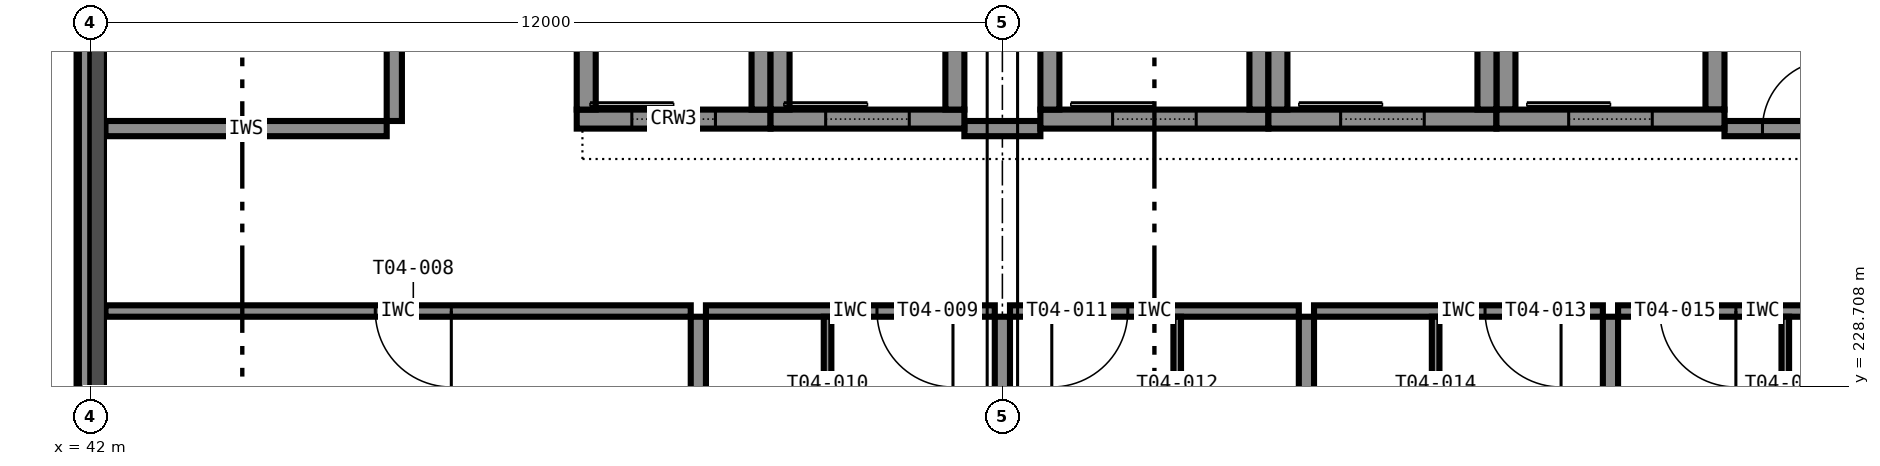
"""IFC4 building model, lengths in metres.
Left out: names, types, materials, properties, quantities, classifications, styles, units other than length and angle.
Written with IfcOpenShell. Run it as: python <this file> out.ifc"""

import sys

from ifc_helpers import new_model, si_unit, direction, frame, frame_2d, origin, place, context, subcontext, project, spatial, rectangle, extrude, element, fill, save


model = new_model("IFC4")
c1 = context("Model", 3, precision=1e-05, world=origin(), true_north=direction((0.0, 1.0)))
c2 = subcontext(c1, "Body", "Model", "MODEL_VIEW")
j1 = project(units=[si_unit("LENGTHUNIT", "METRE"), si_unit("PLANEANGLEUNIT", "RADIAN")], contexts=[c1])
p1 = place(None, origin())
s1 = spatial("IfcSite", under=j1, at=p1, CompositionType="ELEMENT")
p2 = place(p1, origin())
s2 = spatial("IfcBuilding", under=s1, at=p2, CompositionType="ELEMENT")
p3 = place(p2, frame((0.0, 0.0, 24.6)))
s3 = spatial("IfcBuildingStorey", under=s2, at=p3, CompositionType="ELEMENT", Elevation=24.6)
p4 = place(p3, frame((54.5, 232.225, 0.0), z_axis=(0.0, 0.0, 1.0), x_axis=(1.0, 0.0, 0.0)))
e1 = element("IfcWall", 1, at=p4, inside=s3, PredefinedType="SHEAR", context=c2, shape_type="SweptSolid", body=[
    extrude(rectangle(XDim=3.0, YDim=0.25, at=frame_2d((1.5, 0.0))), origin(), (0.0, 0.0, 1.0), 3.6),
])
p5 = place(p4, frame((0.95, 0.0, 0.0)))
e2 = element("IfcOpeningElement", 2, at=p5, cuts=e1, PredefinedType="OPENING", context=c2, shape_type="SweptSolid", body=[
    extrude(rectangle(XDim=1.1, YDim=2.1, at=frame_2d((0.55, 1.05))), frame((0.0, 0.135, 0.0), z_axis=(0.0, -1.0, 0.0), x_axis=(1.0, 0.0, 0.0)), (0.0, 0.0, 1.0), 0.27),
])
for number, where, z_axis, x_axis in (
    (3, (54.625, 232.35, 0.0), (0.0, 0.0, 1.0), (0.0, 1.0, 0.0)),
    (4, (57.375, 232.35, 0.0), (0.0, 0.0, 1.0), (0.0, 1.0, 0.0)),
):
    element("IfcWall", number, at=place(p3, frame(where, z_axis=z_axis, x_axis=x_axis)), inside=s3, PredefinedType="SHEAR", context=c2, shape_type="SweptSolid", body=[
        extrude(rectangle(XDim=3.3, YDim=0.25, at=frame_2d((1.65, 0.0))), origin(), (0.0, 0.0, 1.0), 3.6),
    ])
p6 = place(p3, frame((57.5, 232.225, 0.0), z_axis=(0.0, 0.0, 1.0), x_axis=(1.0, 0.0, 0.0)))
e5 = element("IfcWall", 5, at=p6, inside=s3, PredefinedType="SHEAR", context=c2, shape_type="SweptSolid", body=[
    extrude(rectangle(XDim=3.0, YDim=0.25, at=frame_2d((1.5, 0.0))), origin(), (0.0, 0.0, 1.0), 3.6),
])
p7 = place(p6, frame((0.95, 0.0, 0.0)))
e6 = element("IfcOpeningElement", 6, at=p7, cuts=e5, PredefinedType="OPENING", context=c2, shape_type="SweptSolid", body=[
    extrude(rectangle(XDim=1.1, YDim=2.1, at=frame_2d((0.55, 1.05))), frame((0.0, 0.135, 0.0), z_axis=(0.0, -1.0, 0.0), x_axis=(1.0, 0.0, 0.0)), (0.0, 0.0, 1.0), 0.27),
])
for number, where, z_axis, x_axis in (
    (7, (57.625, 232.35, 0.0), (0.0, 0.0, 1.0), (0.0, 1.0, 0.0)),
    (8, (60.375, 232.35, 0.0), (0.0, 0.0, 1.0), (0.0, 1.0, 0.0)),
):
    element("IfcWall", number, at=place(p3, frame(where, z_axis=z_axis, x_axis=x_axis)), inside=s3, PredefinedType="SHEAR", context=c2, shape_type="SweptSolid", body=[
        extrude(rectangle(XDim=3.3, YDim=0.25, at=frame_2d((1.65, 0.0))), origin(), (0.0, 0.0, 1.0), 3.6),
    ])
p8 = place(p3, frame((60.5, 232.225, 0.0), z_axis=(0.0, 0.0, 1.0), x_axis=(1.0, 0.0, 0.0)))
e9 = element("IfcWall", 9, at=p8, inside=s3, PredefinedType="SHEAR", context=c2, shape_type="SweptSolid", body=[
    extrude(rectangle(XDim=3.0, YDim=0.25, at=frame_2d((1.5, 0.0))), origin(), (0.0, 0.0, 1.0), 3.6),
])
p9 = place(p8, frame((0.95, 0.0, 0.0)))
e10 = element("IfcOpeningElement", 10, at=p9, cuts=e9, PredefinedType="OPENING", context=c2, shape_type="SweptSolid", body=[
    extrude(rectangle(XDim=1.1, YDim=2.1, at=frame_2d((0.55, 1.05))), frame((0.0, 0.135, 0.0), z_axis=(0.0, -1.0, 0.0), x_axis=(1.0, 0.0, 0.0)), (0.0, 0.0, 1.0), 0.27),
])
for number, where, z_axis, x_axis in (
    (11, (60.625, 232.35, 0.0), (0.0, 0.0, 1.0), (0.0, 1.0, 0.0)),
    (12, (63.375, 232.35, 0.0), (0.0, 0.0, 1.0), (0.0, 1.0, 0.0)),
):
    element("IfcWall", number, at=place(p3, frame(where, z_axis=z_axis, x_axis=x_axis)), inside=s3, PredefinedType="SHEAR", context=c2, shape_type="SweptSolid", body=[
        extrude(rectangle(XDim=3.3, YDim=0.25, at=frame_2d((1.65, 0.0))), origin(), (0.0, 0.0, 1.0), 3.6),
    ])
p10 = place(p3, frame((48.4, 232.225, 0.0), z_axis=(0.0, 0.0, 1.0), x_axis=(1.0, 0.0, 0.0)))
e13 = element("IfcWall", 13, at=p10, inside=s3, PredefinedType="SHEAR", context=c2, shape_type="SweptSolid", body=[
    extrude(rectangle(XDim=2.55, YDim=0.25, at=frame_2d((1.275, 0.0))), origin(), (0.0, 0.0, 1.0), 3.6),
])
p11 = place(p10, frame((0.725, 0.0, 0.0)))
e14 = element("IfcOpeningElement", 14, at=p11, cuts=e13, PredefinedType="OPENING", context=c2, shape_type="SweptSolid", body=[
    extrude(rectangle(XDim=1.1, YDim=2.1, at=frame_2d((0.55, 1.05))), frame((0.0, 0.135, 0.0), z_axis=(0.0, -1.0, 0.0), x_axis=(1.0, 0.0, 0.0)), (0.0, 0.0, 1.0), 0.27),
])
for number, where, z_axis, x_axis in (
    (15, (48.525, 232.35, 0.0), (0.0, 0.0, 1.0), (0.0, 1.0, 0.0)),
    (16, (50.825, 232.35, 0.0), (0.0, 0.0, 1.0), (0.0, 1.0, 0.0)),
):
    element("IfcWall", number, at=place(p3, frame(where, z_axis=z_axis, x_axis=x_axis)), inside=s3, PredefinedType="SHEAR", context=c2, shape_type="SweptSolid", body=[
        extrude(rectangle(XDim=3.3, YDim=0.25, at=frame_2d((1.65, 0.0))), origin(), (0.0, 0.0, 1.0), 3.6),
    ])
p12 = place(p3, frame((50.95, 232.225, 0.0), z_axis=(0.0, 0.0, 1.0), x_axis=(1.0, 0.0, 0.0)))
e17 = element("IfcWall", 17, at=p12, inside=s3, PredefinedType="SHEAR", context=c2, shape_type="SweptSolid", body=[
    extrude(rectangle(XDim=2.55, YDim=0.25, at=frame_2d((1.275, 0.0))), origin(), (0.0, 0.0, 1.0), 3.6),
])
p13 = place(p12, frame((0.725, 0.0, 0.0)))
e18 = element("IfcOpeningElement", 18, at=p13, cuts=e17, PredefinedType="OPENING", context=c2, shape_type="SweptSolid", body=[
    extrude(rectangle(XDim=1.1, YDim=2.1, at=frame_2d((0.55, 1.05))), frame((0.0, 0.135, 0.0), z_axis=(0.0, -1.0, 0.0), x_axis=(1.0, 0.0, 0.0)), (0.0, 0.0, 1.0), 0.27),
])
for number, where, z_axis, x_axis in (
    (19, (51.075, 232.35, 0.0), (0.0, 0.0, 1.0), (0.0, 1.0, 0.0)),
    (20, (53.375, 232.35, 0.0), (0.0, 0.0, 1.0), (0.0, 1.0, 0.0)),
):
    element("IfcWall", number, at=place(p3, frame(where, z_axis=z_axis, x_axis=x_axis)), inside=s3, PredefinedType="SHEAR", context=c2, shape_type="SweptSolid", body=[
        extrude(rectangle(XDim=3.3, YDim=0.25, at=frame_2d((1.65, 0.0))), origin(), (0.0, 0.0, 1.0), 3.6),
    ])
p14 = place(p3, frame((41.925, 233.55, 3.4), z_axis=(0.0, 0.0, 1.0), x_axis=(0.0, -1.0, 0.0)))
e21 = element("IfcWall", 21, at=p14, inside=s3, PredefinedType="STANDARD", context=c2, shape_type="SweptSolid", body=[
    extrude(rectangle(XDim=11.1, YDim=0.15, at=frame_2d((5.55, 0.0))), origin(), (0.0, 0.0, 1.0), 0.2),
])
p15 = place(p3, frame((42.2, 232.1, 0.0), z_axis=(0.0, 0.0, 1.0), x_axis=(1.0, 0.0, 0.0)))
e22 = element("IfcWall", 22, at=p15, inside=s3, PredefinedType="PARTITIONING", context=c2, shape_type="SweptSolid", body=[
    extrude(rectangle(XDim=3.7, YDim=0.2, at=frame_2d((1.85, 0.0))), origin(), (0.0, 0.0, 1.0), 3.4),
])
p16 = place(p3, frame((53.5, 232.1, 0.0), z_axis=(0.0, 0.0, 1.0), x_axis=(1.0, 0.0, 0.0)))
e23 = element("IfcWall", 23, at=p16, inside=s3, PredefinedType="PARTITIONING", context=c2, shape_type="SweptSolid", body=[
    extrude(rectangle(XDim=1.0, YDim=0.2, at=frame_2d((0.5, 0.0))), origin(), (0.0, 0.0, 1.0), 3.4),
])
p17 = place(p3, frame((63.5, 232.1, 0.0), z_axis=(0.0, 0.0, 1.0), x_axis=(1.0, 0.0, 0.0)))
e24 = element("IfcWall", 24, at=p17, inside=s3, PredefinedType="PARTITIONING", context=c2, shape_type="SweptSolid", body=[
    extrude(rectangle(XDim=1.9, YDim=0.2, at=frame_2d((0.95, 0.0))), origin(), (0.0, 0.0, 1.0), 3.4),
])
p18 = place(p17, frame((0.5, 0.0, 0.0)))
e25 = element("IfcOpeningElement", 25, at=p18, cuts=e24, PredefinedType="OPENING", context=c2, shape_type="SweptSolid", body=[
    extrude(rectangle(XDim=0.9, YDim=2.1, at=frame_2d((0.45, 1.05))), frame((0.0, 0.11, 0.0), z_axis=(0.0, -1.0, 0.0), x_axis=(1.0, 0.0, 0.0)), (0.0, 0.0, 1.0), 0.22),
])
p19 = place(p3, frame((46.0, 232.2, 0.0), z_axis=(0.0, 0.0, 1.0), x_axis=(0.0, 1.0, 0.0)))
e26 = element("IfcWall", 26, at=p19, inside=s3, PredefinedType="PARTITIONING", context=c2, shape_type="SweptSolid", body=[
    extrude(rectangle(XDim=3.6, YDim=0.2, at=frame_2d((1.8, 0.0))), origin(), (0.0, 0.0, 1.0), 3.4),
])
p20 = place(p19, frame((1.35, 0.0, 0.0)))
e27 = element("IfcOpeningElement", 27, at=p20, cuts=e26, PredefinedType="OPENING", context=c2, shape_type="SweptSolid", body=[
    extrude(rectangle(XDim=0.9, YDim=2.1, at=frame_2d((0.45, 1.05))), frame((0.0, 0.11, 0.0), z_axis=(0.0, -1.0, 0.0), x_axis=(1.0, 0.0, 0.0)), (0.0, 0.0, 1.0), 0.22),
])
p21 = place(p3, frame((49.9, 229.7, 0.0), z_axis=(0.0, 0.0, 1.0), x_axis=(-1.0, 0.0, 0.0)))
e28 = element("IfcWall", 28, at=p21, inside=s3, PredefinedType="PARTITIONING", context=c2, shape_type="SweptSolid", body=[
    extrude(rectangle(XDim=7.7, YDim=0.15, at=frame_2d((3.85, 0.0))), origin(), (0.0, 0.0, 1.0), 3.4),
])
p22 = place(p21, frame((3.15, 0.0, 0.0)))
e29 = element("IfcOpeningElement", 29, at=p22, cuts=e28, PredefinedType="OPENING", context=c2, shape_type="SweptSolid", body=[
    extrude(rectangle(XDim=1.0, YDim=2.1, at=frame_2d((0.5, 1.05))), frame((0.0, 0.085, 0.0), z_axis=(0.0, -1.0, 0.0), x_axis=(1.0, 0.0, 0.0)), (0.0, 0.0, 1.0), 0.17),
])
p23 = place(p3, frame((53.9, 229.7, 0.0), z_axis=(0.0, 0.0, 1.0), x_axis=(-1.0, 0.0, 0.0)))
e30 = element("IfcWall", 30, at=p23, inside=s3, PredefinedType="PARTITIONING", context=c2, shape_type="SweptSolid", body=[
    extrude(rectangle(XDim=3.8, YDim=0.15, at=frame_2d((1.9, 0.0))), origin(), (0.0, 0.0, 1.0), 3.4),
])
p24 = place(p23, frame((0.55, 0.0, 0.0)))
e31 = element("IfcOpeningElement", 31, at=p24, cuts=e30, PredefinedType="OPENING", context=c2, shape_type="SweptSolid", body=[
    extrude(rectangle(XDim=1.0, YDim=2.1, at=frame_2d((0.5, 1.05))), frame((0.0, 0.085, 0.0), z_axis=(0.0, -1.0, 0.0), x_axis=(1.0, 0.0, 0.0)), (0.0, 0.0, 1.0), 0.17),
])
p25 = place(p3, frame((51.7, 229.625, 0.0), z_axis=(0.0, 0.0, 1.0), x_axis=(0.0, -1.0, 0.0)))
e32 = element("IfcWall", 32, at=p25, inside=s3, PredefinedType="PARTITIONING", context=c2, shape_type="SweptSolid", body=[
    extrude(rectangle(XDim=2.875, YDim=0.1, at=frame_2d((1.438, 0.0))), origin(), (0.0, 0.0, 1.0), 3.4),
])
p26 = place(p25, frame((1.038, 0.0, 0.0)))
e33 = element("IfcOpeningElement", 33, at=p26, cuts=e32, PredefinedType="OPENING", context=c2, shape_type="SweptSolid", body=[
    extrude(rectangle(XDim=0.8, YDim=2.1, at=frame_2d((0.4, 1.05))), frame((0.0, 0.06, 0.0), z_axis=(0.0, -1.0, 0.0), x_axis=(1.0, 0.0, 0.0)), (0.0, 0.0, 1.0), 0.12),
])
p27 = place(p3, frame((57.9, 229.7, 0.0), z_axis=(0.0, 0.0, 1.0), x_axis=(-1.0, 0.0, 0.0)))
e34 = element("IfcWall", 34, at=p27, inside=s3, PredefinedType="PARTITIONING", context=c2, shape_type="SweptSolid", body=[
    extrude(rectangle(XDim=3.8, YDim=0.15, at=frame_2d((1.9, 0.0))), origin(), (0.0, 0.0, 1.0), 3.4),
])
p28 = place(p27, frame((2.25, 0.0, 0.0)))
e35 = element("IfcOpeningElement", 35, at=p28, cuts=e34, PredefinedType="OPENING", context=c2, shape_type="SweptSolid", body=[
    extrude(rectangle(XDim=1.0, YDim=2.1, at=frame_2d((0.5, 1.05))), frame((0.0, 0.085, 0.0), z_axis=(0.0, -1.0, 0.0), x_axis=(1.0, 0.0, 0.0)), (0.0, 0.0, 1.0), 0.17),
])
p29 = place(p3, frame((56.3, 226.75, 0.0), z_axis=(0.0, 0.0, 1.0), x_axis=(0.0, 1.0, 0.0)))
e36 = element("IfcWall", 36, at=p29, inside=s3, PredefinedType="PARTITIONING", context=c2, shape_type="SweptSolid", body=[
    extrude(rectangle(XDim=2.875, YDim=0.1, at=frame_2d((1.438, 0.0))), origin(), (0.0, 0.0, 1.0), 3.4),
])
p30 = place(p29, frame((1.038, 0.0, 0.0)))
e37 = element("IfcOpeningElement", 37, at=p30, cuts=e36, PredefinedType="OPENING", context=c2, shape_type="SweptSolid", body=[
    extrude(rectangle(XDim=0.8, YDim=2.1, at=frame_2d((0.4, 1.05))), frame((0.0, 0.06, 0.0), z_axis=(0.0, -1.0, 0.0), x_axis=(1.0, 0.0, 0.0)), (0.0, 0.0, 1.0), 0.12),
])
p31 = place(p3, frame((61.9, 229.7, 0.0), z_axis=(0.0, 0.0, 1.0), x_axis=(-1.0, 0.0, 0.0)))
e38 = element("IfcWall", 38, at=p31, inside=s3, PredefinedType="PARTITIONING", context=c2, shape_type="SweptSolid", body=[
    extrude(rectangle(XDim=3.8, YDim=0.15, at=frame_2d((1.9, 0.0))), origin(), (0.0, 0.0, 1.0), 3.4),
])
p32 = place(p31, frame((0.55, 0.0, 0.0)))
e39 = element("IfcOpeningElement", 39, at=p32, cuts=e38, PredefinedType="OPENING", context=c2, shape_type="SweptSolid", body=[
    extrude(rectangle(XDim=1.0, YDim=2.1, at=frame_2d((0.5, 1.05))), frame((0.0, 0.085, 0.0), z_axis=(0.0, -1.0, 0.0), x_axis=(1.0, 0.0, 0.0)), (0.0, 0.0, 1.0), 0.17),
])
p33 = place(p3, frame((59.7, 229.625, 0.0), z_axis=(0.0, 0.0, 1.0), x_axis=(0.0, -1.0, 0.0)))
e40 = element("IfcWall", 40, at=p33, inside=s3, PredefinedType="PARTITIONING", context=c2, shape_type="SweptSolid", body=[
    extrude(rectangle(XDim=2.875, YDim=0.1, at=frame_2d((1.438, 0.0))), origin(), (0.0, 0.0, 1.0), 3.4),
])
p34 = place(p33, frame((1.038, 0.0, 0.0)))
e41 = element("IfcOpeningElement", 41, at=p34, cuts=e40, PredefinedType="OPENING", context=c2, shape_type="SweptSolid", body=[
    extrude(rectangle(XDim=0.8, YDim=2.1, at=frame_2d((0.4, 1.05))), frame((0.0, 0.06, 0.0), z_axis=(0.0, -1.0, 0.0), x_axis=(1.0, 0.0, 0.0)), (0.0, 0.0, 1.0), 0.12),
])
p35 = place(p3, frame((65.9, 229.7, 0.0), z_axis=(0.0, 0.0, 1.0), x_axis=(-1.0, 0.0, 0.0)))
e42 = element("IfcWall", 42, at=p35, inside=s3, PredefinedType="PARTITIONING", context=c2, shape_type="SweptSolid", body=[
    extrude(rectangle(XDim=3.8, YDim=0.15, at=frame_2d((1.9, 0.0))), origin(), (0.0, 0.0, 1.0), 3.4),
])
p36 = place(p35, frame((2.25, 0.0, 0.0)))
e43 = element("IfcOpeningElement", 43, at=p36, cuts=e42, PredefinedType="OPENING", context=c2, shape_type="SweptSolid", body=[
    extrude(rectangle(XDim=1.0, YDim=2.1, at=frame_2d((0.5, 1.05))), frame((0.0, 0.085, 0.0), z_axis=(0.0, -1.0, 0.0), x_axis=(1.0, 0.0, 0.0)), (0.0, 0.0, 1.0), 0.17),
])
p37 = place(p3, frame((64.3, 226.75, 0.0), z_axis=(0.0, 0.0, 1.0), x_axis=(0.0, 1.0, 0.0)))
e44 = element("IfcWall", 44, at=p37, inside=s3, PredefinedType="PARTITIONING", context=c2, shape_type="SweptSolid", body=[
    extrude(rectangle(XDim=2.875, YDim=0.1, at=frame_2d((1.438, 0.0))), origin(), (0.0, 0.0, 1.0), 3.4),
])
p38 = place(p37, frame((1.038, 0.0, 0.0)))
e45 = element("IfcOpeningElement", 45, at=p38, cuts=e44, PredefinedType="OPENING", context=c2, shape_type="SweptSolid", body=[
    extrude(rectangle(XDim=0.8, YDim=2.1, at=frame_2d((0.4, 1.05))), frame((0.0, 0.06, 0.0), z_axis=(0.0, -1.0, 0.0), x_axis=(1.0, 0.0, 0.0)), (0.0, 0.0, 1.0), 0.12),
])
p39 = place(p3, frame((50.0, 222.3, 0.0), z_axis=(0.0, 0.0, 1.0), x_axis=(0.0, 1.0, 0.0)))
e46 = element("IfcWall", 46, at=p39, inside=s3, PredefinedType="PARTITIONING", context=c2, shape_type="SweptSolid", body=[
    extrude(rectangle(XDim=7.325, YDim=0.2, at=frame_2d((3.663, 0.0))), origin(), (0.0, 0.0, 1.0), 3.4),
])
p40 = place(p3, frame((54.0, 222.45, 0.0), z_axis=(0.0, 0.0, 1.0), x_axis=(0.0, 1.0, 0.0)))
e47 = element("IfcWall", 47, at=p40, inside=s3, PredefinedType="PARTITIONING", context=c2, shape_type="SweptSolid", body=[
    extrude(rectangle(XDim=7.175, YDim=0.2, at=frame_2d((3.587, 0.0))), origin(), (0.0, 0.0, 1.0), 2.6),
])
for number, where, z_axis, x_axis in (
    (48, (58.0, 222.3, 0.0), (0.0, 0.0, 1.0), (0.0, 1.0, 0.0)),
    (49, (62.0, 222.3, 0.0), (0.0, 0.0, 1.0), (0.0, 1.0, 0.0)),
):
    element("IfcWall", number, at=place(p3, frame(where, z_axis=z_axis, x_axis=x_axis)), inside=s3, PredefinedType="PARTITIONING", context=c2, shape_type="SweptSolid", body=[
        extrude(rectangle(XDim=7.325, YDim=0.2, at=frame_2d((3.663, 0.0))), origin(), (0.0, 0.0, 1.0), 3.4),
    ])
p41 = place(p18, origin())
e50 = element("IfcDoor", 50, at=p41, inside=s3, OperationType="SINGLE_SWING_RIGHT", PredefinedType="DOOR", context=c2, shape_type="SweptSolid", body=[
    extrude(rectangle(XDim=0.9, YDim=2.1, at=frame_2d((0.45, 1.05))), frame((0.0, 0.025, 0.0), z_axis=(0.0, -1.0, 0.0), x_axis=(1.0, 0.0, 0.0)), (0.0, 0.0, 1.0), 0.05),
])
fill(e25, e50)
p42 = place(p22, origin())
e51 = element("IfcDoor", 51, at=p42, inside=s3, OperationType="SINGLE_SWING_LEFT", PredefinedType="DOOR", context=c2, shape_type="SweptSolid", body=[
    extrude(rectangle(XDim=1.0, YDim=2.1, at=frame_2d((0.5, 1.05))), frame((0.0, 0.025, 0.0), z_axis=(0.0, -1.0, 0.0), x_axis=(1.0, 0.0, 0.0)), (0.0, 0.0, 1.0), 0.05),
])
fill(e29, e51)
p43 = place(p24, origin())
e52 = element("IfcDoor", 52, at=p43, inside=s3, OperationType="SINGLE_SWING_LEFT", PredefinedType="DOOR", context=c2, shape_type="SweptSolid", body=[
    extrude(rectangle(XDim=1.0, YDim=2.1, at=frame_2d((0.5, 1.05))), frame((0.0, 0.025, 0.0), z_axis=(0.0, -1.0, 0.0), x_axis=(1.0, 0.0, 0.0)), (0.0, 0.0, 1.0), 0.05),
])
fill(e31, e52)
p44 = place(p28, origin())
e53 = element("IfcDoor", 53, at=p44, inside=s3, OperationType="SINGLE_SWING_RIGHT", PredefinedType="DOOR", context=c2, shape_type="SweptSolid", body=[
    extrude(rectangle(XDim=1.0, YDim=2.1, at=frame_2d((0.5, 1.05))), frame((0.0, 0.025, 0.0), z_axis=(0.0, -1.0, 0.0), x_axis=(1.0, 0.0, 0.0)), (0.0, 0.0, 1.0), 0.05),
])
fill(e35, e53)
p45 = place(p32, origin())
e54 = element("IfcDoor", 54, at=p45, inside=s3, OperationType="SINGLE_SWING_LEFT", PredefinedType="DOOR", context=c2, shape_type="SweptSolid", body=[
    extrude(rectangle(XDim=1.0, YDim=2.1, at=frame_2d((0.5, 1.05))), frame((0.0, 0.025, 0.0), z_axis=(0.0, -1.0, 0.0), x_axis=(1.0, 0.0, 0.0)), (0.0, 0.0, 1.0), 0.05),
])
fill(e39, e54)
p46 = place(p36, origin())
e55 = element("IfcDoor", 55, at=p46, inside=s3, OperationType="SINGLE_SWING_LEFT", PredefinedType="DOOR", context=c2, shape_type="SweptSolid", body=[
    extrude(rectangle(XDim=1.0, YDim=2.1, at=frame_2d((0.5, 1.05))), frame((0.0, 0.025, 0.0), z_axis=(0.0, -1.0, 0.0), x_axis=(1.0, 0.0, 0.0)), (0.0, 0.0, 1.0), 0.05),
])
fill(e43, e55)
p47 = place(p5, origin())
e56 = element("IfcDoor", 56, at=p47, inside=s3, OperationType="SLIDING_TO_LEFT", PredefinedType="DOOR", context=c2, shape_type="SweptSolid", body=[
    extrude(rectangle(XDim=1.1, YDim=2.1, at=frame_2d((0.55, 1.05))), frame((0.0, 0.025, 0.0), z_axis=(0.0, -1.0, 0.0), x_axis=(1.0, 0.0, 0.0)), (0.0, 0.0, 1.0), 0.05),
])
fill(e2, e56)
p48 = place(p7, origin())
e57 = element("IfcDoor", 57, at=p48, inside=s3, OperationType="SLIDING_TO_LEFT", PredefinedType="DOOR", context=c2, shape_type="SweptSolid", body=[
    extrude(rectangle(XDim=1.1, YDim=2.1, at=frame_2d((0.55, 1.05))), frame((0.0, 0.025, 0.0), z_axis=(0.0, -1.0, 0.0), x_axis=(1.0, 0.0, 0.0)), (0.0, 0.0, 1.0), 0.05),
])
fill(e6, e57)
p49 = place(p9, origin())
e58 = element("IfcDoor", 58, at=p49, inside=s3, OperationType="SLIDING_TO_LEFT", PredefinedType="DOOR", context=c2, shape_type="SweptSolid", body=[
    extrude(rectangle(XDim=1.1, YDim=2.1, at=frame_2d((0.55, 1.05))), frame((0.0, 0.025, 0.0), z_axis=(0.0, -1.0, 0.0), x_axis=(1.0, 0.0, 0.0)), (0.0, 0.0, 1.0), 0.05),
])
fill(e10, e58)
p50 = place(p11, origin())
e59 = element("IfcDoor", 59, at=p50, inside=s3, OperationType="SLIDING_TO_LEFT", PredefinedType="DOOR", context=c2, shape_type="SweptSolid", body=[
    extrude(rectangle(XDim=1.1, YDim=2.1, at=frame_2d((0.55, 1.05))), frame((0.0, 0.025, 0.0), z_axis=(0.0, -1.0, 0.0), x_axis=(1.0, 0.0, 0.0)), (0.0, 0.0, 1.0), 0.05),
])
fill(e14, e59)
p51 = place(p13, origin())
e60 = element("IfcDoor", 60, at=p51, inside=s3, OperationType="SLIDING_TO_LEFT", PredefinedType="DOOR", context=c2, shape_type="SweptSolid", body=[
    extrude(rectangle(XDim=1.1, YDim=2.1, at=frame_2d((0.55, 1.05))), frame((0.0, 0.025, 0.0), z_axis=(0.0, -1.0, 0.0), x_axis=(1.0, 0.0, 0.0)), (0.0, 0.0, 1.0), 0.05),
])
fill(e18, e60)
save(model, sys.argv[1])
